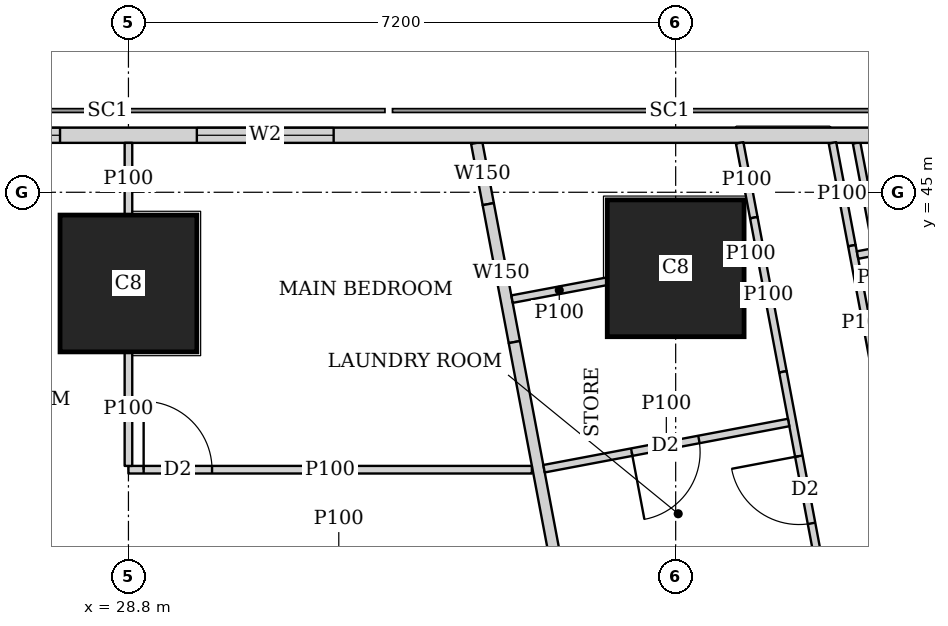
"""IFC4 building model, lengths in metres.
Left out: names, types, materials, properties, quantities, classifications, styles, units other than length and angle.
Written with IfcOpenShell. Run it as: python <this file> out.ifc"""

import sys

from ifc_helpers import new_model, si_unit, direction, frame, frame_2d, origin, origin_2d, place, context, subcontext, project, spatial, rectangle, extrude, element, fill, save


model = new_model("IFC4")
c1 = context("Model", 3, precision=1e-05, world=origin(), true_north=direction((0.0, 1.0)))
c2 = subcontext(c1, "Body", "Model", "MODEL_VIEW")
j1 = project(units=[si_unit("LENGTHUNIT", "METRE"), si_unit("PLANEANGLEUNIT", "RADIAN")], contexts=[c1])
p1 = place(None, origin())
s1 = spatial("IfcSite", under=j1, at=p1, CompositionType="ELEMENT")
p2 = place(p1, origin())
s2 = spatial("IfcBuilding", under=s1, at=p2, CompositionType="ELEMENT")
p3 = place(p2, frame((0.0, 0.0, 147.05)))
s3 = spatial("IfcBuildingStorey", under=s2, at=p3, CompositionType="ELEMENT", Elevation=147.05)
for number, where, z_axis, x_axis in (
    (1, (28.8, 43.8, 0.0), (0.0, 0.0, 1.0), (1.0, 0.0, 0.0)),
    (2, (36.0, 44.0, 0.0), (0.0, 0.0, 1.0), (1.0, 0.0, 0.0)),
):
    element("IfcColumn", number, at=place(p3, frame(where, z_axis=z_axis, x_axis=x_axis)), inside=s3, PredefinedType="COLUMN", context=c2, shape_type="SweptSolid", body=[
        extrude(rectangle(XDim=1.8, YDim=1.8, at=origin_2d()), origin(), (0.0, 0.0, 1.0), 3.75),
    ])
p4 = place(p3, frame((40.106, 45.75, 0.0), z_axis=(0.0, 0.0, 1.0), x_axis=(-1.0, 0.0, 0.0)))
e3 = element("IfcWall", 3, at=p4, inside=s3, PredefinedType="SOLIDWALL", context=c2, shape_type="SweptSolid", body=[
    extrude(rectangle(XDim=37.943, YDim=0.2, at=frame_2d((18.971, 0.0))), origin(), (0.0, 0.0, 1.0), 3.5),
])
p5 = place(p4, frame((8.606, 0.0, 0.9)))
e4 = element("IfcOpeningElement", 4, at=p5, cuts=e3, PredefinedType="OPENING", context=c2, shape_type="SweptSolid", body=[
    extrude(rectangle(XDim=1.8, YDim=1.5, at=frame_2d((0.9, 0.75))), frame((0.0, 0.11, 0.0), z_axis=(0.0, -1.0, 0.0), x_axis=(1.0, 0.0, 0.0)), (0.0, 0.0, 1.0), 0.22),
])
p6 = place(p4, frame((12.206, 0.0, 0.9)))
e5 = element("IfcOpeningElement", 5, at=p6, cuts=e3, PredefinedType="OPENING", context=c2, shape_type="SweptSolid", body=[
    extrude(rectangle(XDim=1.8, YDim=1.5, at=frame_2d((0.9, 0.75))), frame((0.0, 0.11, 0.0), z_axis=(0.0, -1.0, 0.0), x_axis=(1.0, 0.0, 0.0)), (0.0, 0.0, 1.0), 0.22),
])
p7 = place(p4, frame((15.806, 0.0, 0.9)))
e6 = element("IfcOpeningElement", 6, at=p7, cuts=e3, PredefinedType="OPENING", context=c2, shape_type="SweptSolid", body=[
    extrude(rectangle(XDim=1.8, YDim=1.5, at=frame_2d((0.9, 0.75))), frame((0.0, 0.11, 0.0), z_axis=(0.0, -1.0, 0.0), x_axis=(1.0, 0.0, 0.0)), (0.0, 0.0, 1.0), 0.22),
])
p8 = place(p4, frame((19.406, 0.0, 0.9)))
e7 = element("IfcOpeningElement", 7, at=p8, cuts=e3, PredefinedType="OPENING", context=c2, shape_type="SweptSolid", body=[
    extrude(rectangle(XDim=1.8, YDim=1.5, at=frame_2d((0.9, 0.75))), frame((0.0, 0.11, 0.0), z_axis=(0.0, -1.0, 0.0), x_axis=(1.0, 0.0, 0.0)), (0.0, 0.0, 1.0), 0.22),
])
p9 = place(p4, frame((23.006, 0.0, 0.9)))
e8 = element("IfcOpeningElement", 8, at=p9, cuts=e3, PredefinedType="OPENING", context=c2, shape_type="SweptSolid", body=[
    extrude(rectangle(XDim=1.8, YDim=1.5, at=frame_2d((0.9, 0.75))), frame((0.0, 0.11, 0.0), z_axis=(0.0, -1.0, 0.0), x_axis=(1.0, 0.0, 0.0)), (0.0, 0.0, 1.0), 0.22),
])
p10 = place(p4, frame((26.606, 0.0, 0.9)))
e9 = element("IfcOpeningElement", 9, at=p10, cuts=e3, PredefinedType="OPENING", context=c2, shape_type="SweptSolid", body=[
    extrude(rectangle(XDim=1.8, YDim=1.5, at=frame_2d((0.9, 0.75))), frame((0.0, 0.11, 0.0), z_axis=(0.0, -1.0, 0.0), x_axis=(1.0, 0.0, 0.0)), (0.0, 0.0, 1.0), 0.22),
])
p11 = place(p3, frame((33.382, 45.65, 0.0), z_axis=(0.0, 0.0, 1.0), x_axis=(0.185169202764, -0.982706653253, 0.0)))
e10 = element("IfcWall", 10, at=p11, inside=s3, PredefinedType="SOLIDWALL", context=c2, shape_type="SweptSolid", body=[
    extrude(rectangle(XDim=0.82, YDim=0.15, at=frame_2d((0.41, 0.0))), origin(), (0.0, 0.0, 1.0), 3.5),
])
p12 = place(p3, frame((33.534, 44.844, 0.0), z_axis=(0.0, 0.0, 1.0), x_axis=(0.185708872674, -0.982604811005, 0.0)))
e11 = element("IfcWall", 11, at=p12, inside=s3, PredefinedType="SOLIDWALL", context=c2, shape_type="SweptSolid", body=[
    extrude(rectangle(XDim=1.847, YDim=0.15, at=frame_2d((0.924, 0.0))), origin(), (0.0, 0.0, 1.0), 2.1),
])
p13 = place(p3, frame((33.877, 43.029, 0.0), z_axis=(0.0, 0.0, 1.0), x_axis=(0.185596841028, -0.98262597798, 0.0)))
e12 = element("IfcWall", 12, at=p13, inside=s3, PredefinedType="SOLIDWALL", context=c2, shape_type="SweptSolid", body=[
    extrude(rectangle(XDim=41.66, YDim=0.15, at=frame_2d((20.83, 0.0))), origin(), (0.0, 0.0, 1.0), 2.5),
])
p14 = place(p13, frame((12.57, 0.0, 0.0)))
e13 = element("IfcOpeningElement", 13, at=p14, cuts=e12, PredefinedType="OPENING", context=c2, shape_type="SweptSolid", body=[
    extrude(rectangle(XDim=1.0, YDim=2.1, at=frame_2d((0.5, 1.05))), frame((0.0, 0.085, 0.0), z_axis=(0.0, -1.0, 0.0), x_axis=(1.0, 0.0, 0.0)), (0.0, 0.0, 1.0), 0.17),
])
p15 = place(p13, frame((16.386, 0.0, 0.0)))
e14 = element("IfcOpeningElement", 14, at=p15, cuts=e12, PredefinedType="OPENING", context=c2, shape_type="SweptSolid", body=[
    extrude(rectangle(XDim=1.0, YDim=2.1, at=frame_2d((0.5, 1.05))), frame((0.0, 0.085, 0.0), z_axis=(0.0, -1.0, 0.0), x_axis=(1.0, 0.0, 0.0)), (0.0, 0.0, 1.0), 0.17),
])
p16 = place(p13, frame((31.166, 0.0, 0.0)))
e15 = element("IfcOpeningElement", 15, at=p16, cuts=e12, PredefinedType="OPENING", context=c2, shape_type="SweptSolid", body=[
    extrude(rectangle(XDim=1.0, YDim=2.1, at=frame_2d((0.5, 1.05))), frame((0.0, 0.085, 0.0), z_axis=(0.0, -1.0, 0.0), x_axis=(1.0, 0.0, 0.0)), (0.0, 0.0, 1.0), 0.17),
])
p17 = place(p3, frame((39.054, 42.085, 0.0), z_axis=(0.0, 0.0, 1.0), x_axis=(-0.185791584218, 0.982589175207, 0.0)))
e16 = element("IfcWall", 16, at=p17, inside=s3, PredefinedType="PARTITIONING", context=c2, shape_type="SweptSolid", body=[
    extrude(rectangle(XDim=3.628, YDim=0.1, at=frame_2d((1.814, 0.0))), origin(), (0.0, 0.0, 1.0), 2.1),
])
p18 = place(p3, frame((38.063, 45.65, 0.0), z_axis=(0.0, 0.0, 1.0), x_axis=(0.185456359766, -0.982652501458, 0.0)))
e17 = element("IfcWall", 17, at=p18, inside=s3, PredefinedType="PARTITIONING", context=c2, shape_type="SweptSolid", body=[
    extrude(rectangle(XDim=1.376, YDim=0.1, at=frame_2d((0.688, 0.0))), origin(), (0.0, 0.0, 1.0), 3.5),
])
p19 = place(p3, frame((38.318, 44.298, 0.0), z_axis=(0.0, 0.0, 1.0), x_axis=(0.185481135188, -0.982647825261, 0.0)))
e18 = element("IfcWall", 18, at=p19, inside=s3, PredefinedType="PARTITIONING", context=c2, shape_type="SweptSolid", body=[
    extrude(rectangle(XDim=2.064, YDim=0.1, at=frame_2d((1.032, 0.0))), origin(), (0.0, 0.0, 1.0), 2.1),
])
p20 = place(p3, frame((36.842, 45.65, 0.0), z_axis=(0.0, 0.0, 1.0), x_axis=(0.185789875365, -0.982589498322, 0.0)))
e19 = element("IfcWall", 19, at=p20, inside=s3, PredefinedType="PARTITIONING", context=c2, shape_type="SweptSolid", body=[
    extrude(rectangle(XDim=1.001, YDim=0.1, at=frame_2d((0.5, 0.0))), origin(), (0.0, 0.0, 1.0), 3.5),
])
p21 = place(p3, frame((37.028, 44.666, 0.0), z_axis=(0.0, 0.0, 1.0), x_axis=(0.185481135188, -0.982647825261, 0.0)))
e20 = element("IfcWall", 20, at=p21, inside=s3, PredefinedType="PARTITIONING", context=c2, shape_type="SweptSolid", body=[
    extrude(rectangle(XDim=2.064, YDim=0.1, at=frame_2d((1.032, 0.0))), origin(), (0.0, 0.0, 1.0), 2.1),
])
p22 = place(p3, frame((37.411, 42.638, 0.0), z_axis=(0.0, 0.0, 1.0), x_axis=(0.185485587071, -0.982646984928, 0.0)))
e21 = element("IfcWall", 21, at=p22, inside=s3, PredefinedType="PARTITIONING", context=c2, shape_type="SweptSolid", body=[
    extrude(rectangle(XDim=10.072, YDim=0.1, at=frame_2d((5.036, 0.0))), origin(), (0.0, 0.0, 1.0), 3.5),
])
p23 = place(p22, frame((8.567, 0.0, 0.0)))
e22 = element("IfcOpeningElement", 22, at=p23, cuts=e21, PredefinedType="OPENING", context=c2, shape_type="SweptSolid", body=[
    extrude(rectangle(XDim=0.9, YDim=2.1, at=frame_2d((0.45, 1.05))), frame((0.0, 0.06, 0.0), z_axis=(0.0, -1.0, 0.0), x_axis=(1.0, 0.0, 0.0)), (0.0, 0.0, 1.0), 0.12),
])
p24 = place(p22, frame((3.188, 0.0, 0.0)))
e23 = element("IfcOpeningElement", 23, at=p24, cuts=e21, PredefinedType="OPENING", context=c2, shape_type="SweptSolid", body=[
    extrude(rectangle(XDim=0.9, YDim=2.1, at=frame_2d((0.45, 1.05))), frame((0.0, 0.06, 0.0), z_axis=(0.0, -1.0, 0.0), x_axis=(1.0, 0.0, 0.0)), (0.0, 0.0, 1.0), 0.12),
])
p25 = place(p22, frame((1.129, 0.0, 0.0)))
e24 = element("IfcOpeningElement", 24, at=p25, cuts=e21, PredefinedType="OPENING", context=c2, shape_type="SweptSolid", body=[
    extrude(rectangle(XDim=0.9, YDim=2.1, at=frame_2d((0.45, 1.05))), frame((0.0, 0.06, 0.0), z_axis=(0.0, -1.0, 0.0), x_axis=(1.0, 0.0, 0.0)), (0.0, 0.0, 1.0), 0.12),
])
p26 = place(p22, frame((5.899, 0.0, 0.0)))
e25 = element("IfcOpeningElement", 25, at=p26, cuts=e21, PredefinedType="OPENING", context=c2, shape_type="SweptSolid", body=[
    extrude(rectangle(XDim=0.9, YDim=2.1, at=frame_2d((0.45, 1.05))), frame((0.0, 0.06, 0.0), z_axis=(0.0, -1.0, 0.0), x_axis=(1.0, 0.0, 0.0)), (0.0, 0.0, 1.0), 0.12),
])
p27 = place(p3, frame((41.968, 44.85, 0.0), z_axis=(0.0, 0.0, 1.0), x_axis=(-0.98258614234, -0.185807623311, 0.0)))
e26 = element("IfcWall", 26, at=p27, inside=s3, PredefinedType="PARTITIONING", context=c2, shape_type="SweptSolid", body=[
    extrude(rectangle(XDim=3.638, YDim=0.1, at=frame_2d((1.819, 0.0))), origin(), (0.0, 0.0, 1.0), 2.1),
])
p28 = place(p3, frame((37.065, 44.201, 0.0), z_axis=(0.0, 0.0, 1.0), x_axis=(-0.983168876381, -0.182699098288, 0.0)))
e27 = element("IfcWall", 27, at=p28, inside=s3, PredefinedType="PARTITIONING", context=c2, shape_type="SweptSolid", body=[
    extrude(rectangle(XDim=0.158, YDim=0.1, at=frame_2d((0.079, 0.0))), origin(), (0.0, 0.0, 1.0), 2.1),
])
p29 = place(p3, frame((35.09, 43.828, 0.0), z_axis=(0.0, 0.0, 1.0), x_axis=(-0.982758384778, -0.184894448668, 0.0)))
e28 = element("IfcWall", 28, at=p29, inside=s3, PredefinedType="PARTITIONING", context=c2, shape_type="SweptSolid", body=[
    extrude(rectangle(XDim=1.265, YDim=0.1, at=frame_2d((0.632, 0.0))), origin(), (0.0, 0.0, 1.0), 2.1),
])
p30 = place(p3, frame((37.486, 41.971, 0.0), z_axis=(0.0, 0.0, 1.0), x_axis=(-0.982620626894, -0.185625169636, 0.0)))
e29 = element("IfcWall", 29, at=p30, inside=s3, PredefinedType="PARTITIONING", context=c2, shape_type="SweptSolid", body=[
    extrude(rectangle(XDim=3.275, YDim=0.1, at=frame_2d((1.637, 0.0))), origin(), (0.0, 0.0, 1.0), 3.5),
])
p31 = place(p30, frame((1.201, 0.0, 0.0)))
e30 = element("IfcOpeningElement", 30, at=p31, cuts=e29, PredefinedType="OPENING", context=c2, shape_type="SweptSolid", body=[
    extrude(rectangle(XDim=0.9, YDim=2.1, at=frame_2d((0.45, 1.05))), frame((0.0, 0.06, 0.0), z_axis=(0.0, -1.0, 0.0), x_axis=(1.0, 0.0, 0.0)), (0.0, 0.0, 1.0), 0.12),
])
p32 = place(p3, frame((28.8, 41.35, 0.0), z_axis=(0.0, 0.0, 1.0), x_axis=(1.0, 0.0, 0.0)))
e31 = element("IfcWall", 31, at=p32, inside=s3, PredefinedType="PARTITIONING", context=c2, shape_type="SweptSolid", body=[
    extrude(rectangle(XDim=5.308, YDim=0.1, at=frame_2d((2.654, 0.0))), origin(), (0.0, 0.0, 1.0), 3.5),
])
p33 = place(p32, frame((0.2, 0.0, 0.0)))
e32 = element("IfcOpeningElement", 32, at=p33, cuts=e31, PredefinedType="OPENING", context=c2, shape_type="SweptSolid", body=[
    extrude(rectangle(XDim=0.9, YDim=2.1, at=frame_2d((0.45, 1.05))), frame((0.0, 0.06, 0.0), z_axis=(0.0, -1.0, 0.0), x_axis=(1.0, 0.0, 0.0)), (0.0, 0.0, 1.0), 0.12),
])
p34 = place(p3, frame((28.8, 41.4, 0.0), z_axis=(0.0, 0.0, 1.0), x_axis=(0.0, 1.0, 0.0)))
e33 = element("IfcWall", 33, at=p34, inside=s3, PredefinedType="PARTITIONING", context=c2, shape_type="SweptSolid", body=[
    extrude(rectangle(XDim=1.499, YDim=0.1, at=frame_2d((0.75, 0.0))), origin(), (0.0, 0.0, 1.0), 3.5),
])
p35 = place(p3, frame((28.8, 44.701, 0.0), z_axis=(0.0, 0.0, 1.0), x_axis=(0.0, 1.0, 0.0)))
e34 = element("IfcWall", 34, at=p35, inside=s3, PredefinedType="PARTITIONING", context=c2, shape_type="SweptSolid", body=[
    extrude(rectangle(XDim=0.949, YDim=0.1, at=frame_2d((0.475, 0.0))), origin(), (0.0, 0.0, 1.0), 3.5),
])
p36 = place(p5, origin())
e35 = element("IfcWindow", 35, at=p36, inside=s3, PartitioningType="SINGLE_PANEL", PredefinedType="WINDOW", context=c2, shape_type="SweptSolid", body=[
    extrude(rectangle(XDim=1.8, YDim=1.5, at=frame_2d((0.9, 0.75))), frame((0.0, 0.03, 0.0), z_axis=(0.0, -1.0, 0.0), x_axis=(1.0, 0.0, 0.0)), (0.0, 0.0, 1.0), 0.06),
])
fill(e4, e35)
p37 = place(p6, origin())
e36 = element("IfcWindow", 36, at=p37, inside=s3, PartitioningType="SINGLE_PANEL", PredefinedType="WINDOW", context=c2, shape_type="SweptSolid", body=[
    extrude(rectangle(XDim=1.8, YDim=1.5, at=frame_2d((0.9, 0.75))), frame((0.0, 0.03, 0.0), z_axis=(0.0, -1.0, 0.0), x_axis=(1.0, 0.0, 0.0)), (0.0, 0.0, 1.0), 0.06),
])
fill(e5, e36)
p38 = place(p25, origin())
e37 = element("IfcDoor", 37, at=p38, inside=s3, OperationType="SINGLE_SWING_RIGHT", PredefinedType="DOOR", context=c2, shape_type="SweptSolid", body=[
    extrude(rectangle(XDim=0.9, YDim=2.1, at=frame_2d((0.45, 1.05))), frame((0.0, 0.025, 0.0), z_axis=(0.0, -1.0, 0.0), x_axis=(1.0, 0.0, 0.0)), (0.0, 0.0, 1.0), 0.05),
])
fill(e24, e37)
p39 = place(p31, origin())
e38 = element("IfcDoor", 38, at=p39, inside=s3, OperationType="SINGLE_SWING_RIGHT", PredefinedType="DOOR", context=c2, shape_type="SweptSolid", body=[
    extrude(rectangle(XDim=0.9, YDim=2.1, at=frame_2d((0.45, 1.05))), frame((0.0, 0.025, 0.0), z_axis=(0.0, -1.0, 0.0), x_axis=(1.0, 0.0, 0.0)), (0.0, 0.0, 1.0), 0.05),
])
fill(e30, e38)
p40 = place(p33, origin())
e39 = element("IfcDoor", 39, at=p40, inside=s3, OperationType="SINGLE_SWING_LEFT", PredefinedType="DOOR", context=c2, shape_type="SweptSolid", body=[
    extrude(rectangle(XDim=0.9, YDim=2.1, at=frame_2d((0.45, 1.05))), frame((0.0, 0.025, 0.0), z_axis=(0.0, -1.0, 0.0), x_axis=(1.0, 0.0, 0.0)), (0.0, 0.0, 1.0), 0.05),
])
fill(e32, e39)
save(model, sys.argv[1])
